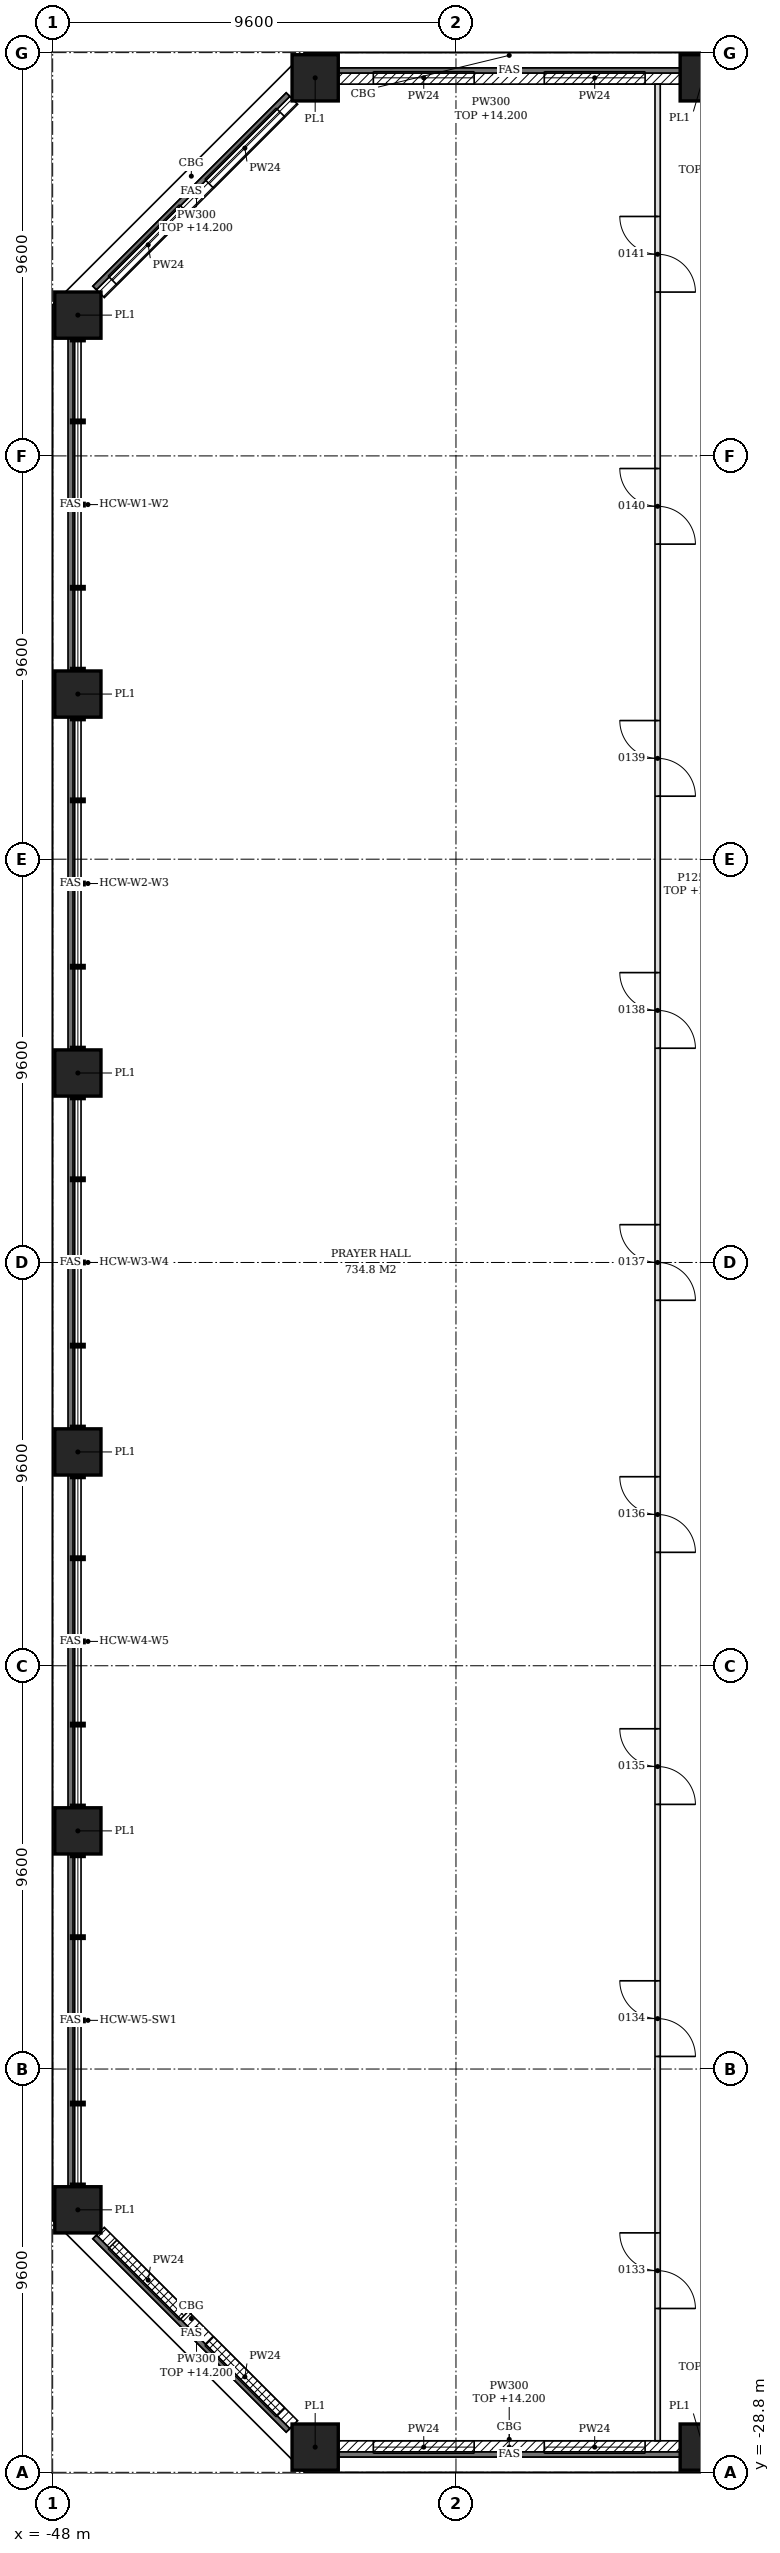
"""IFC4 building model, lengths in metres.
Left out: names, types, materials, properties, quantities, classifications, styles, units other than length and angle.
Written with IfcOpenShell. Run it as: python <this file> out.ifc"""

import sys

from ifc_helpers import new_model, si_unit, direction, frame, frame_2d, origin, origin_2d, place, context, subcontext, project, spatial, polyline, rectangle, hollow_rectangle, outline, extrude, element, fill, save


model = new_model("IFC4")
c1 = context("Model", 3, precision=1e-05, world=origin(), true_north=direction((0.0, 1.0)))
c2 = subcontext(c1, "Body", "Model", "MODEL_VIEW")
j1 = project(units=[si_unit("LENGTHUNIT", "METRE"), si_unit("PLANEANGLEUNIT", "RADIAN")], contexts=[c1])
p1 = place(None, origin())
s1 = spatial("IfcSite", under=j1, at=p1, CompositionType="ELEMENT")
p2 = place(p1, origin())
s2 = spatial("IfcBuilding", under=s1, at=p2, CompositionType="ELEMENT")
p3 = place(p2, frame((0.0, 0.0, 9.0)))
s3 = spatial("IfcBuildingStorey", under=s2, at=p3, CompositionType="ELEMENT", Elevation=9.0)
for number, where, z_axis, x_axis in (
    (1, (-41.751, -28.2, 0.0), (0.0, 0.0, 1.0), (1.0, 0.0, 0.0)),
    (2, (-32.514, -28.2, 0.0), (0.0, 0.0, 1.0), (1.0, 0.0, 0.0)),
    (3, (-32.514, 28.2, 0.0), (0.0, 0.0, 1.0), (1.0, 0.0, 0.0)),
    (4, (-41.751, 28.2, 0.0), (0.0, 0.0, 1.0), (1.0, 0.0, 0.0)),
    (5, (-47.4, 22.552, 0.0), (0.0, 0.0, 1.0), (1.0, 0.0, 0.0)),
    (6, (-47.4, 13.531, 0.0), (0.0, 0.0, 1.0), (1.0, 0.0, 0.0)),
    (7, (-47.4, 4.51, 0.0), (0.0, 0.0, 1.0), (1.0, 0.0, 0.0)),
    (8, (-47.4, -4.51, 0.0), (0.0, 0.0, 1.0), (1.0, 0.0, 0.0)),
    (9, (-47.4, -13.531, 0.0), (0.0, 0.0, 1.0), (1.0, 0.0, 0.0)),
    (10, (-47.4, -22.552, 0.0), (0.0, 0.0, 1.0), (1.0, 0.0, 0.0)),
):
    element("IfcColumn", number, at=place(p3, frame(where, z_axis=z_axis, x_axis=x_axis)), inside=s3, PredefinedType="COLUMN", context=c2, shape_type="SweptSolid", body=[
        extrude(hollow_rectangle(XDim=1.1, YDim=1.1, WallThickness=0.06, at=origin_2d()), origin(), (0.0, 0.0, 1.0), 6.0),
    ])
p4 = place(p3, frame((-41.201, -28.2, 0.0), z_axis=(0.0, 0.0, 1.0), x_axis=(1.0, 0.0, 0.0)))
e11 = element("IfcWall", 11, at=p4, inside=s3, PredefinedType="SOLIDWALL", context=c2, shape_type="SweptSolid", body=[
    extrude(rectangle(XDim=8.138, YDim=0.3, at=frame_2d((4.069, 0.0))), origin(), (0.0, 0.0, 1.0), 5.2),
])
p5 = place(p4, frame((0.834, 0.0, 0.9)))
e12 = element("IfcOpeningElement", 12, at=p5, cuts=e11, PredefinedType="OPENING", context=c2, shape_type="SweptSolid", body=[
    extrude(rectangle(XDim=2.4, YDim=2.4, at=frame_2d((1.2, 1.2))), frame((0.0, 0.16, 0.0), z_axis=(0.0, -1.0, 0.0), x_axis=(1.0, 0.0, 0.0)), (0.0, 0.0, 1.0), 0.32),
])
p6 = place(p4, frame((4.903, 0.0, 0.9)))
e13 = element("IfcOpeningElement", 13, at=p6, cuts=e11, PredefinedType="OPENING", context=c2, shape_type="SweptSolid", body=[
    extrude(rectangle(XDim=2.4, YDim=2.4, at=frame_2d((1.2, 1.2))), frame((0.0, 0.16, 0.0), z_axis=(0.0, -1.0, 0.0), x_axis=(1.0, 0.0, 0.0)), (0.0, 0.0, 1.0), 0.32),
])
p7 = place(p3, frame((-33.064, 28.2, 0.0), z_axis=(0.0, 0.0, 1.0), x_axis=(-1.0, 0.0, 0.0)))
e14 = element("IfcWall", 14, at=p7, inside=s3, PredefinedType="SOLIDWALL", context=c2, shape_type="SweptSolid", body=[
    extrude(rectangle(XDim=8.138, YDim=0.3, at=frame_2d((4.069, 0.0))), origin(), (0.0, 0.0, 1.0), 5.2),
])
p8 = place(p7, frame((0.834, 0.0, 0.9)))
e15 = element("IfcOpeningElement", 15, at=p8, cuts=e14, PredefinedType="OPENING", context=c2, shape_type="SweptSolid", body=[
    extrude(rectangle(XDim=2.4, YDim=2.4, at=frame_2d((1.2, 1.2))), frame((0.0, 0.16, 0.0), z_axis=(0.0, -1.0, 0.0), x_axis=(1.0, 0.0, 0.0)), (0.0, 0.0, 1.0), 0.32),
])
p9 = place(p7, frame((4.903, 0.0, 0.9)))
e16 = element("IfcOpeningElement", 16, at=p9, cuts=e14, PredefinedType="OPENING", context=c2, shape_type="SweptSolid", body=[
    extrude(rectangle(XDim=2.4, YDim=2.4, at=frame_2d((1.2, 1.2))), frame((0.0, 0.16, 0.0), z_axis=(0.0, -1.0, 0.0), x_axis=(1.0, 0.0, 0.0)), (0.0, 0.0, 1.0), 0.32),
])
p10 = place(p3, frame((-42.275, 27.677, 0.0), z_axis=(0.0, 0.0, 1.0), x_axis=(-0.707106781187, -0.707106781187, 0.0)))
e17 = element("IfcWall", 17, at=p10, inside=s3, PredefinedType="SOLIDWALL", context=c2, shape_type="SweptSolid", body=[
    extrude(rectangle(XDim=6.508, YDim=0.3, at=frame_2d((3.254, 0.0))), origin(), (0.0, 0.0, 1.0), 5.2),
])
p11 = place(p10, frame((0.427, 0.0, 0.9)))
e18 = element("IfcOpeningElement", 18, at=p11, cuts=e17, PredefinedType="OPENING", context=c2, shape_type="SweptSolid", body=[
    extrude(rectangle(XDim=2.4, YDim=2.4, at=frame_2d((1.2, 1.2))), frame((0.0, 0.16, 0.0), z_axis=(0.0, -1.0, 0.0), x_axis=(1.0, 0.0, 0.0)), (0.0, 0.0, 1.0), 0.32),
])
p12 = place(p10, frame((3.681, 0.0, 0.9)))
e19 = element("IfcOpeningElement", 19, at=p12, cuts=e17, PredefinedType="OPENING", context=c2, shape_type="SweptSolid", body=[
    extrude(rectangle(XDim=2.4, YDim=2.4, at=frame_2d((1.2, 1.2))), frame((0.0, 0.16, 0.0), z_axis=(0.0, -1.0, 0.0), x_axis=(1.0, 0.0, 0.0)), (0.0, 0.0, 1.0), 0.32),
])
p13 = place(p3, frame((-46.877, -23.075, 0.0), z_axis=(0.0, 0.0, 1.0), x_axis=(0.707106781187, -0.707106781187, 0.0)))
e20 = element("IfcWall", 20, at=p13, inside=s3, PredefinedType="SOLIDWALL", context=c2, shape_type="SweptSolid", body=[
    extrude(rectangle(XDim=6.508, YDim=0.3, at=frame_2d((3.254, 0.0))), origin(), (0.0, 0.0, 1.0), 5.2),
])
p14 = place(p13, frame((0.427, 0.0, 0.9)))
e21 = element("IfcOpeningElement", 21, at=p14, cuts=e20, PredefinedType="OPENING", context=c2, shape_type="SweptSolid", body=[
    extrude(rectangle(XDim=2.4, YDim=2.4, at=frame_2d((1.2, 1.2))), frame((0.0, 0.16, 0.0), z_axis=(0.0, -1.0, 0.0), x_axis=(1.0, 0.0, 0.0)), (0.0, 0.0, 1.0), 0.32),
])
p15 = place(p13, frame((3.681, 0.0, 0.9)))
e22 = element("IfcOpeningElement", 22, at=p15, cuts=e20, PredefinedType="OPENING", context=c2, shape_type="SweptSolid", body=[
    extrude(rectangle(XDim=2.4, YDim=2.4, at=frame_2d((1.2, 1.2))), frame((0.0, 0.16, 0.0), z_axis=(0.0, -1.0, 0.0), x_axis=(1.0, 0.0, 0.0)), (0.0, 0.0, 1.0), 0.32),
])
p16 = place(p3, frame((-33.6, -28.05, 0.0), z_axis=(0.0, 0.0, 1.0), x_axis=(0.0, 1.0, 0.0)))
e23 = element("IfcWall", 23, at=p16, inside=s3, PredefinedType="PARTITIONING", context=c2, shape_type="SweptSolid", body=[
    extrude(outline(polyline([(0.0, 0.0), (56.1, 0.0), (56.1, 11.8), (47.4, 11.8), (47.398, 11.18), (47.1, 11.18), (47.098, 11.8), (42.6, 11.8), (42.598, 11.18), (42.3, 11.18), (42.298, 11.8), (37.8, 11.8), (37.798, 11.18), (37.5, 11.18), (37.498, 11.8), (33.0, 11.8), (32.998, 11.18), (32.7, 11.18), (32.698, 11.8), (28.2, 11.8), (28.198, 11.18), (27.9, 11.18), (27.898, 11.8), (23.4, 11.8), (23.398, 11.18), (23.1, 11.18), (23.098, 11.8), (18.6, 11.8), (18.598, 11.18), (18.3, 11.18), (18.298, 11.8), (13.8, 11.8), (13.798, 11.18), (13.5, 11.18), (13.498, 11.8), (9.0, 11.8), (8.998, 11.18), (8.7, 11.18), (8.698, 11.8), (0.0, 11.8), (0.0, 0.0)])), frame((0.0, 0.062, 0.0), z_axis=(0.0, -1.0, 0.0), x_axis=(1.0, 0.0, 0.0)), (0.0, 0.0, 1.0), 0.125),
])
p17 = place(p16, frame((3.15, 0.0, 0.0)))
e24 = element("IfcOpeningElement", 24, at=p17, cuts=e23, PredefinedType="OPENING", context=c2, shape_type="SweptSolid", body=[
    extrude(rectangle(XDim=1.8, YDim=2.1, at=frame_2d((0.9, 1.05))), frame((0.0, 0.073, 0.0), z_axis=(0.0, -1.0, 0.0), x_axis=(1.0, 0.0, 0.0)), (0.0, 0.0, 1.0), 0.145),
])
p18 = place(p16, frame((9.15, 0.0, 0.0)))
e25 = element("IfcOpeningElement", 25, at=p18, cuts=e23, PredefinedType="OPENING", context=c2, shape_type="SweptSolid", body=[
    extrude(rectangle(XDim=1.8, YDim=2.1, at=frame_2d((0.9, 1.05))), frame((0.0, 0.073, 0.0), z_axis=(0.0, -1.0, 0.0), x_axis=(1.0, 0.0, 0.0)), (0.0, 0.0, 1.0), 0.145),
])
p19 = place(p16, frame((15.15, 0.0, 0.0)))
e26 = element("IfcOpeningElement", 26, at=p19, cuts=e23, PredefinedType="OPENING", context=c2, shape_type="SweptSolid", body=[
    extrude(rectangle(XDim=1.8, YDim=2.1, at=frame_2d((0.9, 1.05))), frame((0.0, 0.073, 0.0), z_axis=(0.0, -1.0, 0.0), x_axis=(1.0, 0.0, 0.0)), (0.0, 0.0, 1.0), 0.145),
])
p20 = place(p16, frame((21.15, 0.0, 0.0)))
e27 = element("IfcOpeningElement", 27, at=p20, cuts=e23, PredefinedType="OPENING", context=c2, shape_type="SweptSolid", body=[
    extrude(rectangle(XDim=1.8, YDim=2.1, at=frame_2d((0.9, 1.05))), frame((0.0, 0.073, 0.0), z_axis=(0.0, -1.0, 0.0), x_axis=(1.0, 0.0, 0.0)), (0.0, 0.0, 1.0), 0.145),
])
p21 = place(p16, frame((27.15, 0.0, 0.0)))
e28 = element("IfcOpeningElement", 28, at=p21, cuts=e23, PredefinedType="OPENING", context=c2, shape_type="SweptSolid", body=[
    extrude(rectangle(XDim=1.8, YDim=2.1, at=frame_2d((0.9, 1.05))), frame((0.0, 0.073, 0.0), z_axis=(0.0, -1.0, 0.0), x_axis=(1.0, 0.0, 0.0)), (0.0, 0.0, 1.0), 0.145),
])
p22 = place(p16, frame((33.15, 0.0, 0.0)))
e29 = element("IfcOpeningElement", 29, at=p22, cuts=e23, PredefinedType="OPENING", context=c2, shape_type="SweptSolid", body=[
    extrude(rectangle(XDim=1.8, YDim=2.1, at=frame_2d((0.9, 1.05))), frame((0.0, 0.073, 0.0), z_axis=(0.0, -1.0, 0.0), x_axis=(1.0, 0.0, 0.0)), (0.0, 0.0, 1.0), 0.145),
])
p23 = place(p16, frame((39.15, 0.0, 0.0)))
e30 = element("IfcOpeningElement", 30, at=p23, cuts=e23, PredefinedType="OPENING", context=c2, shape_type="SweptSolid", body=[
    extrude(rectangle(XDim=1.8, YDim=2.1, at=frame_2d((0.9, 1.05))), frame((0.0, 0.073, 0.0), z_axis=(0.0, -1.0, 0.0), x_axis=(1.0, 0.0, 0.0)), (0.0, 0.0, 1.0), 0.145),
])
p24 = place(p16, frame((45.15, 0.0, 0.0)))
e31 = element("IfcOpeningElement", 31, at=p24, cuts=e23, PredefinedType="OPENING", context=c2, shape_type="SweptSolid", body=[
    extrude(rectangle(XDim=1.8, YDim=2.1, at=frame_2d((0.9, 1.05))), frame((0.0, 0.073, 0.0), z_axis=(0.0, -1.0, 0.0), x_axis=(1.0, 0.0, 0.0)), (0.0, 0.0, 1.0), 0.145),
])
p25 = place(p16, frame((51.15, 0.0, 0.0)))
e32 = element("IfcOpeningElement", 32, at=p25, cuts=e23, PredefinedType="OPENING", context=c2, shape_type="SweptSolid", body=[
    extrude(rectangle(XDim=1.8, YDim=2.1, at=frame_2d((0.9, 1.05))), frame((0.0, 0.073, 0.0), z_axis=(0.0, -1.0, 0.0), x_axis=(1.0, 0.0, 0.0)), (0.0, 0.0, 1.0), 0.145),
])
p26 = place(p5, origin())
e33 = element("IfcWindow", 33, at=p26, inside=s3, PartitioningType="SINGLE_PANEL", PredefinedType="WINDOW", context=c2, shape_type="SweptSolid", body=[
    extrude(rectangle(XDim=2.4, YDim=2.4, at=frame_2d((1.2, 1.2))), frame((0.0, 0.03, 0.0), z_axis=(0.0, -1.0, 0.0), x_axis=(1.0, 0.0, 0.0)), (0.0, 0.0, 1.0), 0.06),
])
fill(e12, e33)
p27 = place(p6, origin())
e34 = element("IfcWindow", 34, at=p27, inside=s3, PartitioningType="SINGLE_PANEL", PredefinedType="WINDOW", context=c2, shape_type="SweptSolid", body=[
    extrude(rectangle(XDim=2.4, YDim=2.4, at=frame_2d((1.2, 1.2))), frame((0.0, 0.03, 0.0), z_axis=(0.0, -1.0, 0.0), x_axis=(1.0, 0.0, 0.0)), (0.0, 0.0, 1.0), 0.06),
])
fill(e13, e34)
p28 = place(p8, origin())
e35 = element("IfcWindow", 35, at=p28, inside=s3, PartitioningType="SINGLE_PANEL", PredefinedType="WINDOW", context=c2, shape_type="SweptSolid", body=[
    extrude(rectangle(XDim=2.4, YDim=2.4, at=frame_2d((1.2, 1.2))), frame((0.0, 0.03, 0.0), z_axis=(0.0, -1.0, 0.0), x_axis=(1.0, 0.0, 0.0)), (0.0, 0.0, 1.0), 0.06),
])
fill(e15, e35)
p29 = place(p9, origin())
e36 = element("IfcWindow", 36, at=p29, inside=s3, PartitioningType="SINGLE_PANEL", PredefinedType="WINDOW", context=c2, shape_type="SweptSolid", body=[
    extrude(rectangle(XDim=2.4, YDim=2.4, at=frame_2d((1.2, 1.2))), frame((0.0, 0.03, 0.0), z_axis=(0.0, -1.0, 0.0), x_axis=(1.0, 0.0, 0.0)), (0.0, 0.0, 1.0), 0.06),
])
fill(e16, e36)
p30 = place(p11, origin())
e37 = element("IfcWindow", 37, at=p30, inside=s3, PartitioningType="SINGLE_PANEL", PredefinedType="WINDOW", context=c2, shape_type="SweptSolid", body=[
    extrude(rectangle(XDim=2.4, YDim=2.4, at=frame_2d((1.2, 1.2))), frame((0.0, 0.03, 0.0), z_axis=(0.0, -1.0, 0.0), x_axis=(1.0, 0.0, 0.0)), (0.0, 0.0, 1.0), 0.06),
])
fill(e18, e37)
p31 = place(p12, origin())
e38 = element("IfcWindow", 38, at=p31, inside=s3, PartitioningType="SINGLE_PANEL", PredefinedType="WINDOW", context=c2, shape_type="SweptSolid", body=[
    extrude(rectangle(XDim=2.4, YDim=2.4, at=frame_2d((1.2, 1.2))), frame((0.0, 0.03, 0.0), z_axis=(0.0, -1.0, 0.0), x_axis=(1.0, 0.0, 0.0)), (0.0, 0.0, 1.0), 0.06),
])
fill(e19, e38)
p32 = place(p14, origin())
e39 = element("IfcWindow", 39, at=p32, inside=s3, PartitioningType="SINGLE_PANEL", PredefinedType="WINDOW", context=c2, shape_type="SweptSolid", body=[
    extrude(rectangle(XDim=2.4, YDim=2.4, at=frame_2d((1.2, 1.2))), frame((0.0, 0.03, 0.0), z_axis=(0.0, -1.0, 0.0), x_axis=(1.0, 0.0, 0.0)), (0.0, 0.0, 1.0), 0.06),
])
fill(e21, e39)
p33 = place(p15, origin())
e40 = element("IfcWindow", 40, at=p33, inside=s3, PartitioningType="SINGLE_PANEL", PredefinedType="WINDOW", context=c2, shape_type="SweptSolid", body=[
    extrude(rectangle(XDim=2.4, YDim=2.4, at=frame_2d((1.2, 1.2))), frame((0.0, 0.03, 0.0), z_axis=(0.0, -1.0, 0.0), x_axis=(1.0, 0.0, 0.0)), (0.0, 0.0, 1.0), 0.06),
])
fill(e22, e40)
p34 = place(p17, frame((1.8, 0.0, 0.0), z_axis=(0.0, 0.0, 1.0), x_axis=(-1.0, 0.0, 0.0)))
e41 = element("IfcDoor", 41, at=p34, inside=s3, OperationType="DOUBLE_DOOR_SINGLE_SWING", PredefinedType="DOOR", context=c2, shape_type="SweptSolid", body=[
    extrude(rectangle(XDim=1.8, YDim=2.1, at=frame_2d((0.9, 1.05))), frame((0.0, 0.025, 0.0), z_axis=(0.0, -1.0, 0.0), x_axis=(1.0, 0.0, 0.0)), (0.0, 0.0, 1.0), 0.05),
])
fill(e24, e41)
p35 = place(p18, frame((1.8, 0.0, 0.0), z_axis=(0.0, 0.0, 1.0), x_axis=(-1.0, 0.0, 0.0)))
e42 = element("IfcDoor", 42, at=p35, inside=s3, OperationType="DOUBLE_DOOR_SINGLE_SWING", PredefinedType="DOOR", context=c2, shape_type="SweptSolid", body=[
    extrude(rectangle(XDim=1.8, YDim=2.1, at=frame_2d((0.9, 1.05))), frame((0.0, 0.025, 0.0), z_axis=(0.0, -1.0, 0.0), x_axis=(1.0, 0.0, 0.0)), (0.0, 0.0, 1.0), 0.05),
])
fill(e25, e42)
p36 = place(p19, frame((1.8, 0.0, 0.0), z_axis=(0.0, 0.0, 1.0), x_axis=(-1.0, 0.0, 0.0)))
e43 = element("IfcDoor", 43, at=p36, inside=s3, OperationType="DOUBLE_DOOR_SINGLE_SWING", PredefinedType="DOOR", context=c2, shape_type="SweptSolid", body=[
    extrude(rectangle(XDim=1.8, YDim=2.1, at=frame_2d((0.9, 1.05))), frame((0.0, 0.025, 0.0), z_axis=(0.0, -1.0, 0.0), x_axis=(1.0, 0.0, 0.0)), (0.0, 0.0, 1.0), 0.05),
])
fill(e26, e43)
p37 = place(p20, frame((1.8, 0.0, 0.0), z_axis=(0.0, 0.0, 1.0), x_axis=(-1.0, 0.0, 0.0)))
e44 = element("IfcDoor", 44, at=p37, inside=s3, OperationType="DOUBLE_DOOR_SINGLE_SWING", PredefinedType="DOOR", context=c2, shape_type="SweptSolid", body=[
    extrude(rectangle(XDim=1.8, YDim=2.1, at=frame_2d((0.9, 1.05))), frame((0.0, 0.025, 0.0), z_axis=(0.0, -1.0, 0.0), x_axis=(1.0, 0.0, 0.0)), (0.0, 0.0, 1.0), 0.05),
])
fill(e27, e44)
p38 = place(p21, frame((1.8, 0.0, 0.0), z_axis=(0.0, 0.0, 1.0), x_axis=(-1.0, 0.0, 0.0)))
e45 = element("IfcDoor", 45, at=p38, inside=s3, OperationType="DOUBLE_DOOR_SINGLE_SWING", PredefinedType="DOOR", context=c2, shape_type="SweptSolid", body=[
    extrude(rectangle(XDim=1.8, YDim=2.1, at=frame_2d((0.9, 1.05))), frame((0.0, 0.025, 0.0), z_axis=(0.0, -1.0, 0.0), x_axis=(1.0, 0.0, 0.0)), (0.0, 0.0, 1.0), 0.05),
])
fill(e28, e45)
p39 = place(p22, frame((1.8, 0.0, 0.0), z_axis=(0.0, 0.0, 1.0), x_axis=(-1.0, 0.0, 0.0)))
e46 = element("IfcDoor", 46, at=p39, inside=s3, OperationType="DOUBLE_DOOR_SINGLE_SWING", PredefinedType="DOOR", context=c2, shape_type="SweptSolid", body=[
    extrude(rectangle(XDim=1.8, YDim=2.1, at=frame_2d((0.9, 1.05))), frame((0.0, 0.025, 0.0), z_axis=(0.0, -1.0, 0.0), x_axis=(1.0, 0.0, 0.0)), (0.0, 0.0, 1.0), 0.05),
])
fill(e29, e46)
p40 = place(p23, frame((1.8, 0.0, 0.0), z_axis=(0.0, 0.0, 1.0), x_axis=(-1.0, 0.0, 0.0)))
e47 = element("IfcDoor", 47, at=p40, inside=s3, OperationType="DOUBLE_DOOR_SINGLE_SWING", PredefinedType="DOOR", context=c2, shape_type="SweptSolid", body=[
    extrude(rectangle(XDim=1.8, YDim=2.1, at=frame_2d((0.9, 1.05))), frame((0.0, 0.025, 0.0), z_axis=(0.0, -1.0, 0.0), x_axis=(1.0, 0.0, 0.0)), (0.0, 0.0, 1.0), 0.05),
])
fill(e30, e47)
p41 = place(p24, frame((1.8, 0.0, 0.0), z_axis=(0.0, 0.0, 1.0), x_axis=(-1.0, 0.0, 0.0)))
e48 = element("IfcDoor", 48, at=p41, inside=s3, OperationType="DOUBLE_DOOR_SINGLE_SWING", PredefinedType="DOOR", context=c2, shape_type="SweptSolid", body=[
    extrude(rectangle(XDim=1.8, YDim=2.1, at=frame_2d((0.9, 1.05))), frame((0.0, 0.025, 0.0), z_axis=(0.0, -1.0, 0.0), x_axis=(1.0, 0.0, 0.0)), (0.0, 0.0, 1.0), 0.05),
])
fill(e31, e48)
p42 = place(p25, frame((1.8, 0.0, 0.0), z_axis=(0.0, 0.0, 1.0), x_axis=(-1.0, 0.0, 0.0)))
e49 = element("IfcDoor", 49, at=p42, inside=s3, OperationType="DOUBLE_DOOR_SINGLE_SWING", PredefinedType="DOOR", context=c2, shape_type="SweptSolid", body=[
    extrude(rectangle(XDim=1.8, YDim=2.1, at=frame_2d((0.9, 1.05))), frame((0.0, 0.025, 0.0), z_axis=(0.0, -1.0, 0.0), x_axis=(1.0, 0.0, 0.0)), (0.0, 0.0, 1.0), 0.05),
])
fill(e32, e49)
save(model, sys.argv[1])
